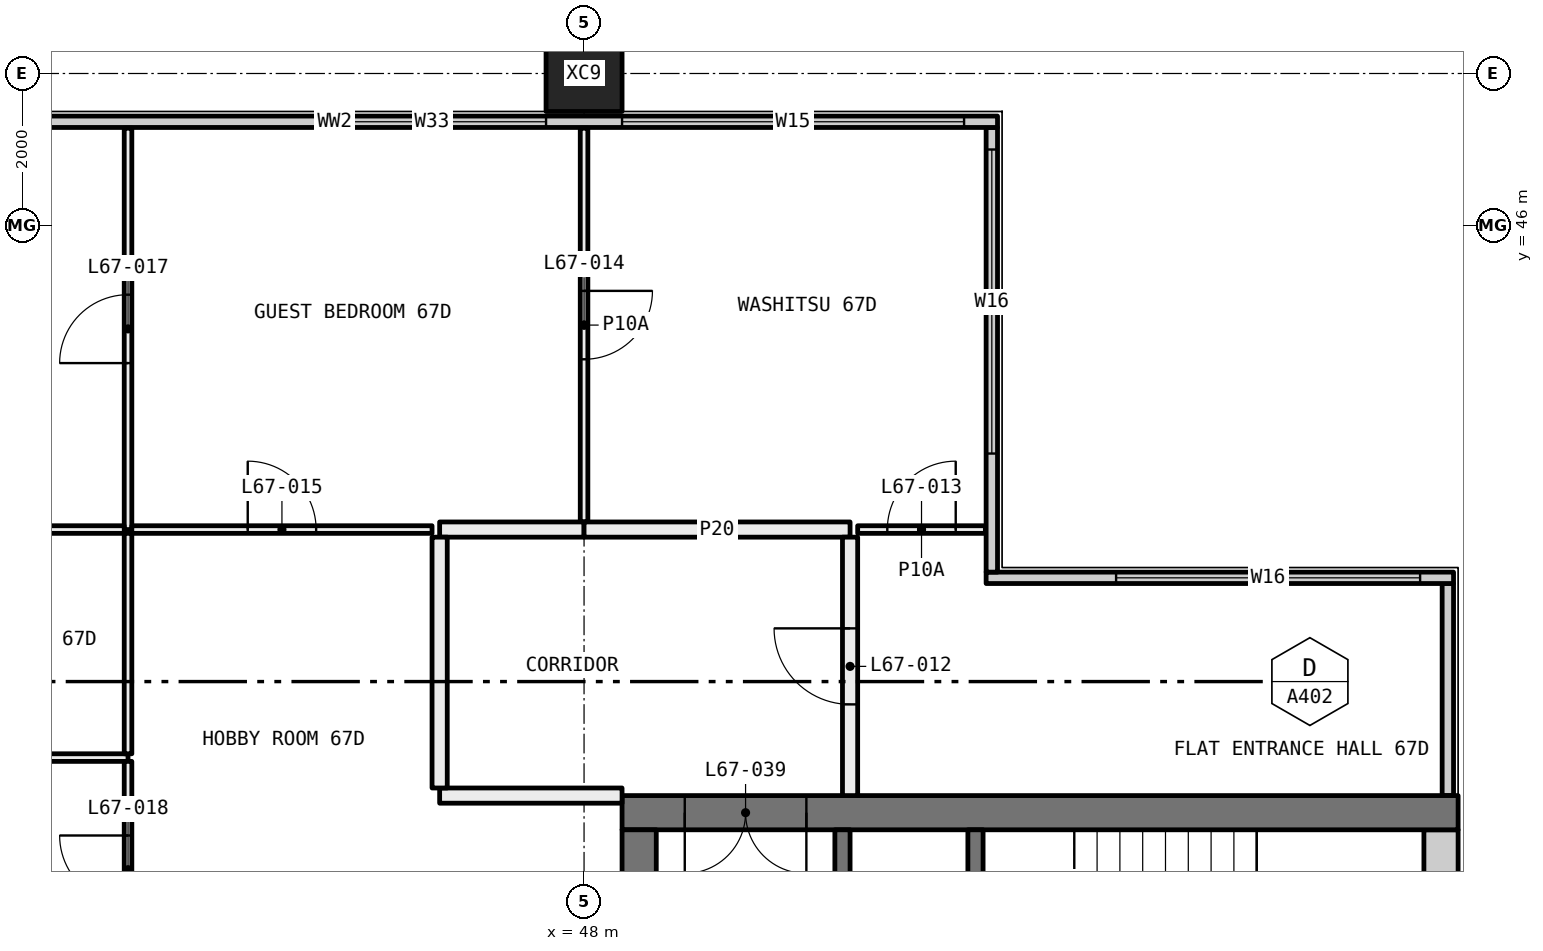
"""IFC4 building model, lengths in metres.
Left out: names, types, materials, properties, quantities, classifications, styles, units other than length and angle.
Written with IfcOpenShell. Run it as: python <this file> out.ifc"""

import sys

from ifc_helpers import new_model, si_unit, direction, frame, frame_2d, origin, origin_2d, place, context, subcontext, project, spatial, rectangle, hollow_rectangle, extrude, element, fill, save


model = new_model("IFC4")
c1 = context("Model", 3, precision=1e-05, world=origin(), true_north=direction((0.0, 1.0)))
c2 = subcontext(c1, "Body", "Model", "MODEL_VIEW")
j1 = project(units=[si_unit("LENGTHUNIT", "METRE"), si_unit("PLANEANGLEUNIT", "RADIAN")], contexts=[c1])
p1 = place(None, origin())
s1 = spatial("IfcSite", under=j1, at=p1, CompositionType="ELEMENT")
p2 = place(p1, origin())
s2 = spatial("IfcBuilding", under=s1, at=p2, CompositionType="ELEMENT")
p3 = place(p2, frame((0.0, 0.0, 249.0)))
s3 = spatial("IfcBuildingStorey", under=s2, at=p3, CompositionType="ELEMENT", Elevation=249.0)
p4 = place(p3, frame((48.0, 48.0, -0.4), z_axis=(0.0, 0.0, 1.0), x_axis=(1.0, 0.0, 0.0)))
e1 = element("IfcColumn", 1, at=p4, inside=s3, PredefinedType="COLUMN", context=c2, shape_type="SweptSolid", body=[
    extrude(hollow_rectangle(XDim=1.0, YDim=1.0, WallThickness=0.036, at=origin_2d()), origin(), (0.0, 0.0, 1.0), 3.45),
])
p5 = place(p3, frame((59.365, 38.5, 0.0), z_axis=(0.0, 0.0, 1.0), x_axis=(0.0, 1.0, 0.0)))
e2 = element("IfcWall", 2, at=p5, inside=s3, PredefinedType="ELEMENTEDWALL", context=c2, shape_type="SweptSolid", body=[
    extrude(rectangle(XDim=2.79, YDim=0.15, at=frame_2d((1.395, 0.0))), origin(), (0.0, 0.0, 1.0), 3.05),
])
p6 = place(p3, frame((53.29, 41.365, 0.0), z_axis=(0.0, 0.0, 1.0), x_axis=(1.0, 0.0, 0.0)))
e3 = element("IfcWall", 3, at=p6, inside=s3, PredefinedType="ELEMENTEDWALL", context=c2, shape_type="SweptSolid", body=[
    extrude(rectangle(XDim=6.15, YDim=0.15, at=frame_2d((3.075, 0.0))), origin(), (0.0, 0.0, 1.0), 3.05),
])
p7 = place(p6, frame((1.71, 0.0, 0.45)))
e4 = element("IfcOpeningElement", 4, at=p7, cuts=e3, PredefinedType="OPENING", context=c2, shape_type="SweptSolid", body=[
    extrude(rectangle(XDim=4.0, YDim=2.55, at=frame_2d((2.0, 1.275))), frame((0.0, 0.085, 0.0), z_axis=(0.0, -1.0, 0.0), x_axis=(1.0, 0.0, 0.0)), (0.0, 0.0, 1.0), 0.17),
])
p8 = place(p3, frame((53.365, 41.44, 0.0), z_axis=(0.0, 0.0, 1.0), x_axis=(0.0, 1.0, 0.0)))
e5 = element("IfcWall", 5, at=p8, inside=s3, PredefinedType="ELEMENTEDWALL", context=c2, shape_type="SweptSolid", body=[
    extrude(rectangle(XDim=5.85, YDim=0.15, at=frame_2d((2.925, 0.0))), origin(), (0.0, 0.0, 1.0), 3.05),
])
p9 = place(p8, frame((1.56, 0.0, 0.45)))
e6 = element("IfcOpeningElement", 6, at=p9, cuts=e5, PredefinedType="OPENING", context=c2, shape_type="SweptSolid", body=[
    extrude(rectangle(XDim=4.0, YDim=2.55, at=frame_2d((2.0, 1.275))), frame((0.0, 0.085, 0.0), z_axis=(0.0, -1.0, 0.0), x_axis=(1.0, 0.0, 0.0)), (0.0, 0.0, 1.0), 0.17),
])
p10 = place(p3, frame((36.0, 47.365, 0.0), z_axis=(0.0, 0.0, 1.0), x_axis=(1.0, 0.0, 0.0)))
e7 = element("IfcWall", 7, at=p10, inside=s3, PredefinedType="ELEMENTEDWALL", context=c2, shape_type="SweptSolid", body=[
    extrude(rectangle(XDim=17.44, YDim=0.15, at=frame_2d((8.72, 0.0))), origin(), (0.0, 0.0, 1.0), 3.05),
])
p11 = place(p10, frame((0.5, 0.0, 0.45)))
e8 = element("IfcOpeningElement", 8, at=p11, cuts=e7, PredefinedType="OPENING", context=c2, shape_type="SweptSolid", body=[
    extrude(rectangle(XDim=3.0, YDim=2.55, at=frame_2d((1.5, 1.275))), frame((0.0, 0.085, 0.0), z_axis=(0.0, -1.0, 0.0), x_axis=(1.0, 0.0, 0.0)), (0.0, 0.0, 1.0), 0.17),
])
p12 = place(p10, frame((8.5, 0.0, 0.45)))
e9 = element("IfcOpeningElement", 9, at=p12, cuts=e7, PredefinedType="OPENING", context=c2, shape_type="SweptSolid", body=[
    extrude(rectangle(XDim=3.0, YDim=2.55, at=frame_2d((1.5, 1.275))), frame((0.0, 0.085, 0.0), z_axis=(0.0, -1.0, 0.0), x_axis=(1.0, 0.0, 0.0)), (0.0, 0.0, 1.0), 0.17),
])
p13 = place(p10, frame((12.5, 0.0, 0.45)))
e10 = element("IfcOpeningElement", 10, at=p13, cuts=e7, PredefinedType="OPENING", context=c2, shape_type="SweptSolid", body=[
    extrude(rectangle(XDim=4.5, YDim=2.55, at=frame_2d((2.25, 1.275))), frame((0.0, 0.085, 0.0), z_axis=(0.0, -1.0, 0.0), x_axis=(1.0, 0.0, 0.0)), (0.0, 0.0, 1.0), 0.17),
])
p14 = place(p3, frame((42.0, 42.0, 0.0), z_axis=(0.0, 0.0, 1.0), x_axis=(0.0, 1.0, 0.0)))
e11 = element("IfcWall", 11, at=p14, inside=s3, PredefinedType="PARTITIONING", context=c2, shape_type="SweptSolid", body=[
    extrude(rectangle(XDim=5.28, YDim=0.1, at=frame_2d((2.64, 0.0))), origin(), (0.0, 0.0, 1.0), 3.05),
])
p15 = place(p14, frame((2.19, 0.0, 0.0)))
e12 = element("IfcOpeningElement", 12, at=p15, cuts=e11, PredefinedType="OPENING", context=c2, shape_type="SweptSolid", body=[
    extrude(rectangle(XDim=0.9, YDim=2.1, at=frame_2d((0.45, 1.05))), frame((0.0, 0.06, 0.0), z_axis=(0.0, -1.0, 0.0), x_axis=(1.0, 0.0, 0.0)), (0.0, 0.0, 1.0), 0.12),
])
p16 = place(p3, frame((36.1, 42.0, 0.0), z_axis=(0.0, 0.0, 1.0), x_axis=(1.0, 0.0, 0.0)))
e13 = element("IfcWall", 13, at=p16, inside=s3, PredefinedType="PARTITIONING", context=c2, shape_type="SweptSolid", body=[
    extrude(rectangle(XDim=5.85, YDim=0.1, at=frame_2d((2.925, 0.0))), origin(), (0.0, 0.0, 1.0), 3.05),
])
p17 = place(p3, frame((48.0, 42.1, 0.0), z_axis=(0.0, 0.0, 1.0), x_axis=(0.0, 1.0, 0.0)))
e14 = element("IfcWall", 14, at=p17, inside=s3, PredefinedType="PARTITIONING", context=c2, shape_type="SweptSolid", body=[
    extrude(rectangle(XDim=5.18, YDim=0.1, at=frame_2d((2.59, 0.0))), origin(), (0.0, 0.0, 1.0), 3.05),
])
p18 = place(p17, frame((2.14, 0.0, 0.0)))
e15 = element("IfcOpeningElement", 15, at=p18, cuts=e14, PredefinedType="OPENING", context=c2, shape_type="SweptSolid", body=[
    extrude(rectangle(XDim=0.9, YDim=2.1, at=frame_2d((0.45, 1.05))), frame((0.0, 0.06, 0.0), z_axis=(0.0, -1.0, 0.0), x_axis=(1.0, 0.0, 0.0)), (0.0, 0.0, 1.0), 0.12),
])
p19 = place(p3, frame((42.05, 42.0, 0.0), z_axis=(0.0, 0.0, 1.0), x_axis=(1.0, 0.0, 0.0)))
e16 = element("IfcWall", 16, at=p19, inside=s3, PredefinedType="PARTITIONING", context=c2, shape_type="SweptSolid", body=[
    extrude(rectangle(XDim=3.95, YDim=0.1, at=frame_2d((1.975, 0.0))), origin(), (0.0, 0.0, 1.0), 3.05),
])
p20 = place(p19, frame((1.525, 0.0, 0.0)))
e17 = element("IfcOpeningElement", 17, at=p20, cuts=e16, PredefinedType="OPENING", context=c2, shape_type="SweptSolid", body=[
    extrude(rectangle(XDim=0.9, YDim=2.1, at=frame_2d((0.45, 1.05))), frame((0.0, 0.06, 0.0), z_axis=(0.0, -1.0, 0.0), x_axis=(1.0, 0.0, 0.0)), (0.0, 0.0, 1.0), 0.12),
])
p21 = place(p3, frame((46.1, 42.0, 0.0), z_axis=(0.0, 0.0, 1.0), x_axis=(1.0, 0.0, 0.0)))
e18 = element("IfcWall", 18, at=p21, inside=s3, PredefinedType="PARTITIONING", context=c2, shape_type="SweptSolid", body=[
    extrude(rectangle(XDim=1.9, YDim=0.2, at=frame_2d((0.95, 0.0))), origin(), (0.0, 0.0, 1.0), 3.05),
])
p22 = place(p3, frame((51.6, 42.0, 0.0), z_axis=(0.0, 0.0, 1.0), x_axis=(1.0, 0.0, 0.0)))
e19 = element("IfcWall", 19, at=p22, inside=s3, PredefinedType="PARTITIONING", context=c2, shape_type="SweptSolid", body=[
    extrude(rectangle(XDim=1.68, YDim=0.1, at=frame_2d((0.84, 0.0))), origin(), (0.0, 0.0, 1.0), 3.05),
])
p23 = place(p22, frame((0.39, 0.0, 0.0)))
e20 = element("IfcOpeningElement", 20, at=p23, cuts=e19, PredefinedType="OPENING", context=c2, shape_type="SweptSolid", body=[
    extrude(rectangle(XDim=0.9, YDim=2.1, at=frame_2d((0.45, 1.05))), frame((0.0, 0.06, 0.0), z_axis=(0.0, -1.0, 0.0), x_axis=(1.0, 0.0, 0.0)), (0.0, 0.0, 1.0), 0.12),
])
p24 = place(p3, frame((48.0, 42.0, 0.0), z_axis=(0.0, 0.0, 1.0), x_axis=(1.0, 0.0, 0.0)))
e21 = element("IfcWall", 21, at=p24, inside=s3, PredefinedType="PARTITIONING", context=c2, shape_type="SweptSolid", body=[
    extrude(rectangle(XDim=3.5, YDim=0.2, at=frame_2d((1.75, 0.0))), origin(), (0.0, 0.0, 1.0), 3.05),
])
p25 = place(p3, frame((51.5, 41.9, 0.0), z_axis=(0.0, 0.0, 1.0), x_axis=(0.0, -1.0, 0.0)))
e22 = element("IfcWall", 22, at=p25, inside=s3, PredefinedType="PARTITIONING", context=c2, shape_type="SweptSolid", body=[
    extrude(rectangle(XDim=3.4, YDim=0.2, at=frame_2d((1.7, 0.0))), origin(), (0.0, 0.0, 1.0), 3.05),
])
p26 = place(p25, frame((1.2, 0.0, 0.0)))
e23 = element("IfcOpeningElement", 23, at=p26, cuts=e22, PredefinedType="OPENING", context=c2, shape_type="SweptSolid", body=[
    extrude(rectangle(XDim=1.0, YDim=2.1, at=frame_2d((0.5, 1.05))), frame((0.0, 0.11, 0.0), z_axis=(0.0, -1.0, 0.0), x_axis=(1.0, 0.0, 0.0)), (0.0, 0.0, 1.0), 0.22),
])
p27 = place(p3, frame((42.0, 39.0, 0.0), z_axis=(0.0, 0.0, 1.0), x_axis=(-1.0, 0.0, 0.0)))
e24 = element("IfcWall", 24, at=p27, inside=s3, PredefinedType="PARTITIONING", context=c2, shape_type="SweptSolid", body=[
    extrude(rectangle(XDim=5.9, YDim=0.1, at=frame_2d((2.95, 0.0))), origin(), (0.0, 0.0, 1.0), 3.05),
])
p28 = place(p27, frame((2.5, 0.0, 0.0)))
e25 = element("IfcOpeningElement", 25, at=p28, cuts=e24, PredefinedType="OPENING", context=c2, shape_type="SweptSolid", body=[
    extrude(rectangle(XDim=0.9, YDim=2.1, at=frame_2d((0.45, 1.05))), frame((0.0, 0.06, 0.0), z_axis=(0.0, -1.0, 0.0), x_axis=(1.0, 0.0, 0.0)), (0.0, 0.0, 1.0), 0.12),
])
p29 = place(p3, frame((42.0, 36.1, 0.0), z_axis=(0.0, 0.0, 1.0), x_axis=(0.0, 1.0, 0.0)))
e26 = element("IfcWall", 26, at=p29, inside=s3, PredefinedType="PARTITIONING", context=c2, shape_type="SweptSolid", body=[
    extrude(rectangle(XDim=2.85, YDim=0.1, at=frame_2d((1.425, 0.0))), origin(), (0.0, 0.0, 1.0), 3.05),
])
p30 = place(p29, frame((0.975, 0.0, 0.0)))
e27 = element("IfcOpeningElement", 27, at=p30, cuts=e26, PredefinedType="OPENING", context=c2, shape_type="SweptSolid", body=[
    extrude(rectangle(XDim=0.9, YDim=2.1, at=frame_2d((0.45, 1.05))), frame((0.0, 0.06, 0.0), z_axis=(0.0, -1.0, 0.0), x_axis=(1.0, 0.0, 0.0)), (0.0, 0.0, 1.0), 0.12),
])
p31 = place(p3, frame((42.0, 39.05, 0.0), z_axis=(0.0, 0.0, 1.0), x_axis=(0.0, 1.0, 0.0)))
e28 = element("IfcWall", 28, at=p31, inside=s3, PredefinedType="PARTITIONING", context=c2, shape_type="SweptSolid", body=[
    extrude(rectangle(XDim=2.9, YDim=0.1, at=frame_2d((1.45, 0.0))), origin(), (0.0, 0.0, 1.0), 3.05),
])
p32 = place(p3, frame((48.5, 38.5, 0.0), z_axis=(0.0, 0.0, 1.0), x_axis=(-1.0, 0.0, 0.0)))
e29 = element("IfcWall", 29, at=p32, inside=s3, PredefinedType="PARTITIONING", context=c2, shape_type="SweptSolid", body=[
    extrude(rectangle(XDim=2.4, YDim=0.2, at=frame_2d((1.2, 0.0))), origin(), (0.0, 0.0, 1.0), 3.05),
])
p33 = place(p3, frame((46.1, 38.6, 0.0), z_axis=(0.0, 0.0, 1.0), x_axis=(0.0, 1.0, 0.0)))
e30 = element("IfcWall", 30, at=p33, inside=s3, PredefinedType="PARTITIONING", context=c2, shape_type="SweptSolid", body=[
    extrude(rectangle(XDim=3.3, YDim=0.2, at=frame_2d((1.65, 0.0))), origin(), (0.0, 0.0, 1.0), 3.05),
])
p34 = place(p3, frame((59.5, 38.275, 0.0), z_axis=(0.0, 0.0, 1.0), x_axis=(-1.0, 0.0, 0.0)))
e31 = element("IfcWall", 31, at=p34, inside=s3, PredefinedType="SHEAR", context=c2, shape_type="SweptSolid", body=[
    extrude(rectangle(XDim=11.0, YDim=0.45, at=frame_2d((5.5, 0.0))), origin(), (0.0, 0.0, 1.0), 3.05),
])
p35 = place(p34, frame((8.575, 0.0, 0.0)))
e32 = element("IfcOpeningElement", 32, at=p35, cuts=e31, PredefinedType="OPENING", context=c2, shape_type="SweptSolid", body=[
    extrude(rectangle(XDim=1.6, YDim=2.1, at=frame_2d((0.8, 1.05))), frame((0.0, 0.235, 0.0), z_axis=(0.0, -1.0, 0.0), x_axis=(1.0, 0.0, 0.0)), (0.0, 0.0, 1.0), 0.47),
])
p36 = place(p3, frame((59.275, 21.95, 0.0), z_axis=(0.0, 0.0, 1.0), x_axis=(0.0, 1.0, 0.0)))
e33 = element("IfcWall", 33, at=p36, inside=s3, PredefinedType="SHEAR", context=c2, shape_type="SweptSolid", body=[
    extrude(rectangle(XDim=16.1, YDim=0.45, at=frame_2d((8.05, 0.0))), origin(), (0.0, 0.0, 1.0), 3.05),
])
p37 = place(p3, frame((48.725, 21.95, 0.0), z_axis=(0.0, 0.0, 1.0), x_axis=(0.0, 1.0, 0.0)))
e34 = element("IfcWall", 34, at=p37, inside=s3, PredefinedType="SHEAR", context=c2, shape_type="SweptSolid", body=[
    extrude(rectangle(XDim=16.1, YDim=0.45, at=frame_2d((8.05, 0.0))), origin(), (0.0, 0.0, 1.0), 3.05),
])
p38 = place(p37, frame((7.25, 0.0, 0.0)))
e35 = element("IfcOpeningElement", 35, at=p38, cuts=e34, PredefinedType="OPENING", context=c2, shape_type="SweptSolid", body=[
    extrude(rectangle(XDim=1.6, YDim=2.1, at=frame_2d((0.8, 1.05))), frame((0.0, 0.235, 0.0), z_axis=(0.0, -1.0, 0.0), x_axis=(1.0, 0.0, 0.0)), (0.0, 0.0, 1.0), 0.47),
])
p39 = place(p3, frame((51.4, 25.1, 0.0), z_axis=(0.0, 0.0, 1.0), x_axis=(0.0, 1.0, 0.0)))
e36 = element("IfcWall", 36, at=p39, inside=s3, PredefinedType="SOLIDWALL", context=c2, shape_type="SweptSolid", body=[
    extrude(rectangle(XDim=12.95, YDim=0.2, at=frame_2d((6.475, 0.0))), origin(), (0.0, 0.0, 1.0), 3.05),
])
p40 = place(p39, frame((0.6, 0.0, 0.0)))
e37 = element("IfcOpeningElement", 37, at=p40, cuts=e36, PredefinedType="OPENING", context=c2, shape_type="SweptSolid", body=[
    extrude(rectangle(XDim=1.1, YDim=2.1, at=frame_2d((0.55, 1.05))), frame((0.0, 0.11, 0.0), z_axis=(0.0, -1.0, 0.0), x_axis=(1.0, 0.0, 0.0)), (0.0, 0.0, 1.0), 0.22),
])
p41 = place(p39, frame((3.1, 0.0, 0.0)))
e38 = element("IfcOpeningElement", 38, at=p41, cuts=e36, PredefinedType="OPENING", context=c2, shape_type="SweptSolid", body=[
    extrude(rectangle(XDim=1.1, YDim=2.1, at=frame_2d((0.55, 1.05))), frame((0.0, 0.11, 0.0), z_axis=(0.0, -1.0, 0.0), x_axis=(1.0, 0.0, 0.0)), (0.0, 0.0, 1.0), 0.22),
])
p42 = place(p39, frame((5.6, 0.0, 0.0)))
e39 = element("IfcOpeningElement", 39, at=p42, cuts=e36, PredefinedType="OPENING", context=c2, shape_type="SweptSolid", body=[
    extrude(rectangle(XDim=1.1, YDim=2.1, at=frame_2d((0.55, 1.05))), frame((0.0, 0.11, 0.0), z_axis=(0.0, -1.0, 0.0), x_axis=(1.0, 0.0, 0.0)), (0.0, 0.0, 1.0), 0.22),
])
p43 = place(p39, frame((8.1, 0.0, 0.0)))
e40 = element("IfcOpeningElement", 40, at=p43, cuts=e36, PredefinedType="OPENING", context=c2, shape_type="SweptSolid", body=[
    extrude(rectangle(XDim=1.1, YDim=2.1, at=frame_2d((0.55, 1.05))), frame((0.0, 0.11, 0.0), z_axis=(0.0, -1.0, 0.0), x_axis=(1.0, 0.0, 0.0)), (0.0, 0.0, 1.0), 0.22),
])
p44 = place(p39, frame((10.975, 0.0, 0.0)))
e41 = element("IfcOpeningElement", 41, at=p44, cuts=e36, PredefinedType="OPENING", context=c2, shape_type="SweptSolid", body=[
    extrude(rectangle(XDim=1.0, YDim=2.1, at=frame_2d((0.5, 1.05))), frame((0.0, 0.11, 0.0), z_axis=(0.0, -1.0, 0.0), x_axis=(1.0, 0.0, 0.0)), (0.0, 0.0, 1.0), 0.22),
])
p45 = place(p3, frame((53.15, 35.1, 0.0), z_axis=(0.0, 0.0, 1.0), x_axis=(0.0, 1.0, 0.0)))
e42 = element("IfcWall", 42, at=p45, inside=s3, PredefinedType="SOLIDWALL", context=c2, shape_type="SweptSolid", body=[
    extrude(rectangle(XDim=2.95, YDim=0.2, at=frame_2d((1.475, 0.0))), origin(), (0.0, 0.0, 1.0), 3.05),
])
p46 = place(p45, frame((0.975, 0.0, 0.0)))
e43 = element("IfcOpeningElement", 43, at=p46, cuts=e42, PredefinedType="OPENING", context=c2, shape_type="SweptSolid", body=[
    extrude(rectangle(XDim=1.0, YDim=2.1, at=frame_2d((0.5, 1.05))), frame((0.0, 0.11, 0.0), z_axis=(0.0, -1.0, 0.0), x_axis=(1.0, 0.0, 0.0)), (0.0, 0.0, 1.0), 0.22),
])
p47 = place(p7, origin())
e44 = element("IfcWindow", 44, at=p47, inside=s3, PartitioningType="SINGLE_PANEL", PredefinedType="WINDOW", context=c2, shape_type="SweptSolid", body=[
    extrude(rectangle(XDim=4.0, YDim=2.55, at=frame_2d((2.0, 1.275))), frame((0.0, 0.03, 0.0), z_axis=(0.0, -1.0, 0.0), x_axis=(1.0, 0.0, 0.0)), (0.0, 0.0, 1.0), 0.06),
])
fill(e4, e44)
p48 = place(p9, origin())
e45 = element("IfcWindow", 45, at=p48, inside=s3, PartitioningType="SINGLE_PANEL", PredefinedType="WINDOW", context=c2, shape_type="SweptSolid", body=[
    extrude(rectangle(XDim=4.0, YDim=2.55, at=frame_2d((2.0, 1.275))), frame((0.0, 0.03, 0.0), z_axis=(0.0, -1.0, 0.0), x_axis=(1.0, 0.0, 0.0)), (0.0, 0.0, 1.0), 0.06),
])
fill(e6, e45)
p49 = place(p12, origin())
e46 = element("IfcWindow", 46, at=p49, inside=s3, PartitioningType="SINGLE_PANEL", PredefinedType="WINDOW", context=c2, shape_type="SweptSolid", body=[
    extrude(rectangle(XDim=3.0, YDim=2.55, at=frame_2d((1.5, 1.275))), frame((0.0, 0.03, 0.0), z_axis=(0.0, -1.0, 0.0), x_axis=(1.0, 0.0, 0.0)), (0.0, 0.0, 1.0), 0.06),
])
fill(e9, e46)
p50 = place(p13, origin())
e47 = element("IfcWindow", 47, at=p50, inside=s3, PartitioningType="SINGLE_PANEL", PredefinedType="WINDOW", context=c2, shape_type="SweptSolid", body=[
    extrude(rectangle(XDim=4.5, YDim=2.55, at=frame_2d((2.25, 1.275))), frame((0.0, 0.03, 0.0), z_axis=(0.0, -1.0, 0.0), x_axis=(1.0, 0.0, 0.0)), (0.0, 0.0, 1.0), 0.06),
])
fill(e10, e47)
p51 = place(p26, frame((1.0, 0.0, 0.0), x_axis=(-1.0, 0.0, 0.0)))
e48 = element("IfcDoor", 48, at=p51, inside=s3, OperationType="SINGLE_SWING_LEFT", PredefinedType="DOOR", context=c2, shape_type="SweptSolid", body=[
    extrude(rectangle(XDim=1.0, YDim=2.1, at=frame_2d((0.5, 1.05))), frame((0.0, 0.025, 0.0), z_axis=(0.0, -1.0, 0.0), x_axis=(1.0, 0.0, 0.0)), (0.0, 0.0, 1.0), 0.05),
])
fill(e23, e48)
p52 = place(p23, origin())
e49 = element("IfcDoor", 49, at=p52, inside=s3, OperationType="SINGLE_SWING_LEFT", PredefinedType="DOOR", context=c2, shape_type="SweptSolid", body=[
    extrude(rectangle(XDim=0.9, YDim=2.1, at=frame_2d((0.45, 1.05))), frame((0.0, 0.025, 0.0), z_axis=(0.0, -1.0, 0.0), x_axis=(1.0, 0.0, 0.0)), (0.0, 0.0, 1.0), 0.05),
])
fill(e20, e49)
p53 = place(p18, frame((0.9, 0.0, 0.0), x_axis=(-1.0, 0.0, 0.0)))
e50 = element("IfcDoor", 50, at=p53, inside=s3, OperationType="SINGLE_SWING_RIGHT", PredefinedType="DOOR", context=c2, shape_type="SweptSolid", body=[
    extrude(rectangle(XDim=0.9, YDim=2.1, at=frame_2d((0.45, 1.05))), frame((0.0, 0.025, 0.0), z_axis=(0.0, -1.0, 0.0), x_axis=(1.0, 0.0, 0.0)), (0.0, 0.0, 1.0), 0.05),
])
fill(e15, e50)
p54 = place(p20, origin())
e51 = element("IfcDoor", 51, at=p54, inside=s3, OperationType="SINGLE_SWING_RIGHT", PredefinedType="DOOR", context=c2, shape_type="SweptSolid", body=[
    extrude(rectangle(XDim=0.9, YDim=2.1, at=frame_2d((0.45, 1.05))), frame((0.0, 0.025, 0.0), z_axis=(0.0, -1.0, 0.0), x_axis=(1.0, 0.0, 0.0)), (0.0, 0.0, 1.0), 0.05),
])
fill(e17, e51)
p55 = place(p15, origin())
e52 = element("IfcDoor", 52, at=p55, inside=s3, OperationType="SINGLE_SWING_RIGHT", PredefinedType="DOOR", context=c2, shape_type="SweptSolid", body=[
    extrude(rectangle(XDim=0.9, YDim=2.1, at=frame_2d((0.45, 1.05))), frame((0.0, 0.025, 0.0), z_axis=(0.0, -1.0, 0.0), x_axis=(1.0, 0.0, 0.0)), (0.0, 0.0, 1.0), 0.05),
])
fill(e12, e52)
p56 = place(p30, origin())
e53 = element("IfcDoor", 53, at=p56, inside=s3, OperationType="SINGLE_SWING_LEFT", PredefinedType="DOOR", context=c2, shape_type="SweptSolid", body=[
    extrude(rectangle(XDim=0.9, YDim=2.1, at=frame_2d((0.45, 1.05))), frame((0.0, 0.025, 0.0), z_axis=(0.0, -1.0, 0.0), x_axis=(1.0, 0.0, 0.0)), (0.0, 0.0, 1.0), 0.05),
])
fill(e27, e53)
p57 = place(p35, origin())
e54 = element("IfcDoor", 54, at=p57, inside=s3, OperationType="DOUBLE_DOOR_SINGLE_SWING", PredefinedType="DOOR", context=c2, shape_type="SweptSolid", body=[
    extrude(rectangle(XDim=1.6, YDim=2.1, at=frame_2d((0.8, 1.05))), frame((0.0, 0.025, 0.0), z_axis=(0.0, -1.0, 0.0), x_axis=(1.0, 0.0, 0.0)), (0.0, 0.0, 1.0), 0.05),
])
fill(e32, e54)
save(model, sys.argv[1])
